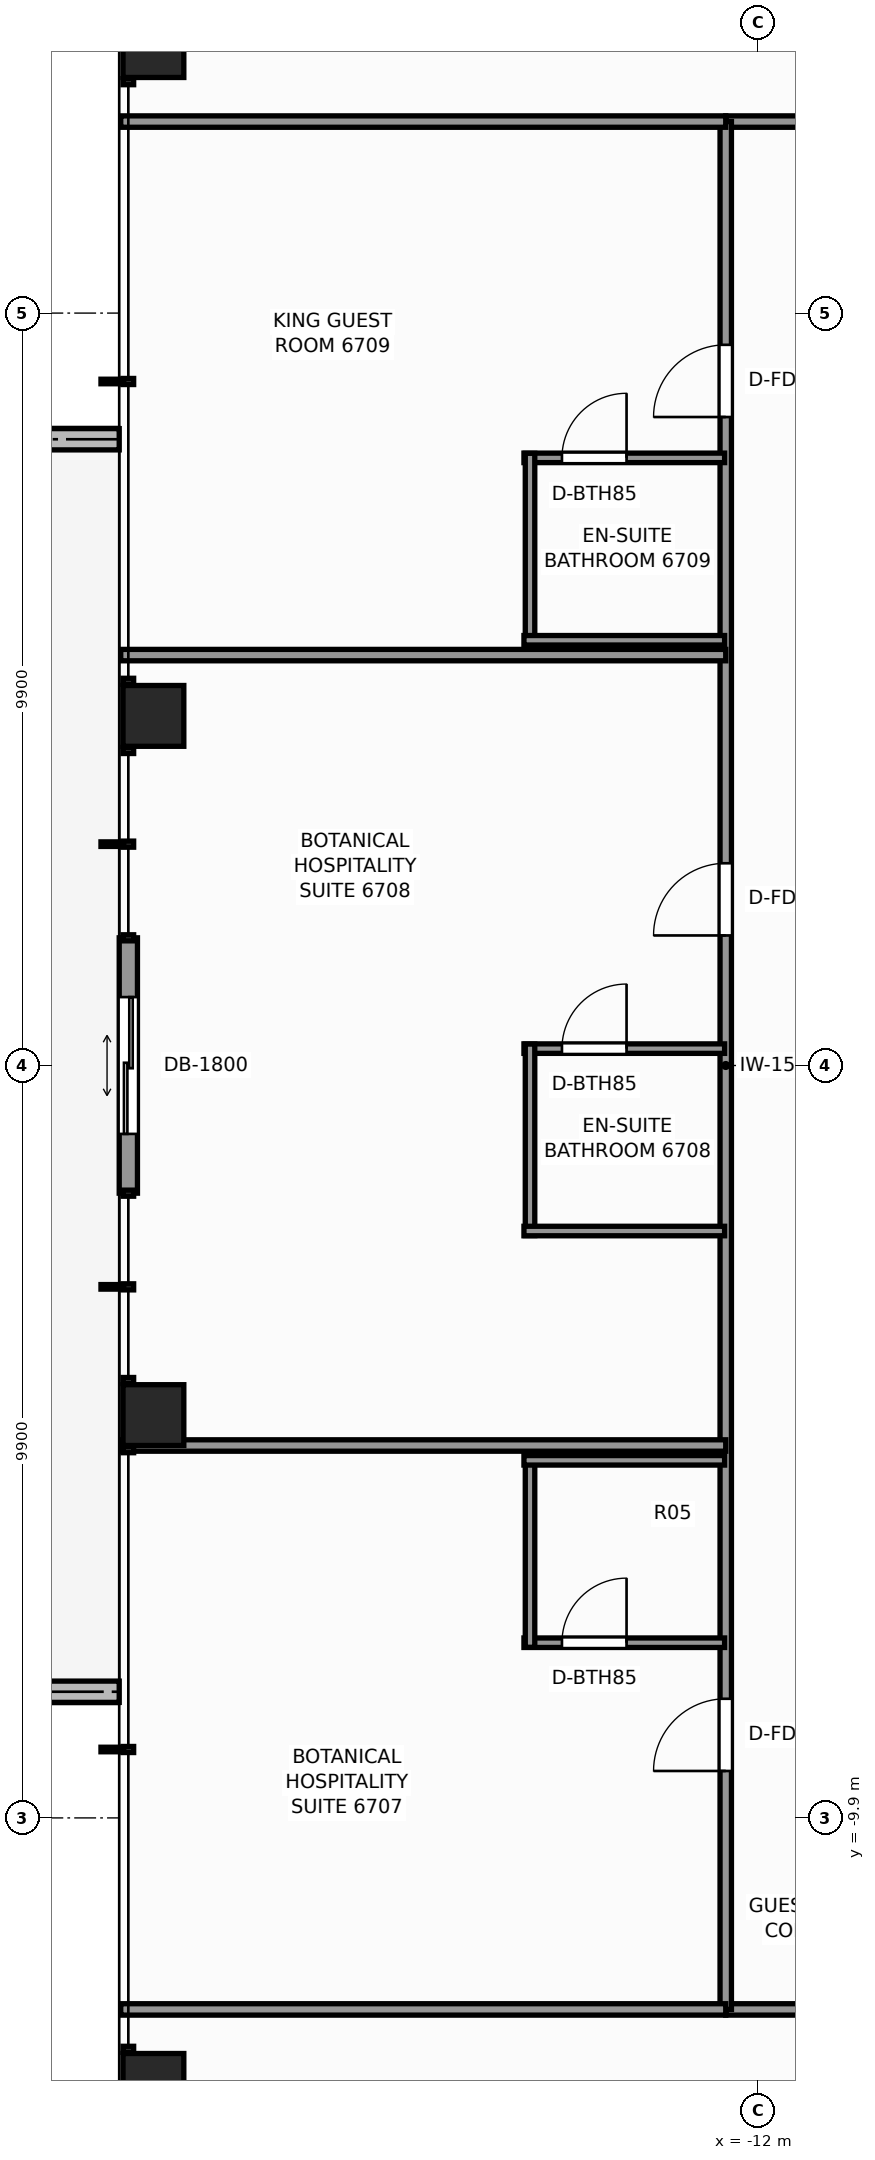
"""IFC4 building model, lengths in metres.
Left out: names, types, materials, properties, quantities, classifications, styles, units other than length and angle.
Written with IfcOpenShell. Run it as: python <this file> out.ifc"""

import sys

from ifc_helpers import new_model, si_unit, direction, frame, frame_2d, origin, origin_2d, place, context, subcontext, project, spatial, rectangle, extrude, element, fill, save


model = new_model("IFC4")
c1 = context("Model", 3, precision=1e-05, world=origin(), true_north=direction((0.0, 1.0)))
c2 = subcontext(c1, "Body", "Model", "MODEL_VIEW")
j1 = project(units=[si_unit("LENGTHUNIT", "METRE"), si_unit("PLANEANGLEUNIT", "RADIAN")], contexts=[c1])
p1 = place(None, origin())
s1 = spatial("IfcSite", under=j1, at=p1, CompositionType="ELEMENT")
p2 = place(p1, origin())
s2 = spatial("IfcBuilding", under=s1, at=p2, CompositionType="ELEMENT")
p3 = place(p2, frame((0.0, 0.0, 229.5)))
s3 = spatial("IfcBuildingStorey", under=s2, at=p3, CompositionType="ELEMENT", Elevation=229.5)
for number, where, z_axis, x_axis in (
    (1, (-19.95, -13.4, 0.0), (0.0, 0.0, 1.0), (1.0, 0.0, 0.0)),
    (2, (-19.95, -4.6, 0.0), (0.0, 0.0, 1.0), (1.0, 0.0, 0.0)),
    (3, (-19.95, 4.6, 0.0), (0.0, 0.0, 1.0), (1.0, 0.0, 0.0)),
    (4, (-19.95, 13.4, 0.0), (0.0, 0.0, 1.0), (1.0, 0.0, 0.0)),
):
    element("IfcColumn", number, at=place(p3, frame(where, z_axis=z_axis, x_axis=x_axis)), inside=s3, PredefinedType="COLUMN", context=c2, shape_type="SweptSolid", body=[
        extrude(rectangle(XDim=0.8, YDim=0.8, at=origin_2d()), origin(), (0.0, 0.0, 1.0), 3.3),
    ])
p4 = place(p3, frame((-23.614, -8.24, -0.04), z_axis=(0.0, 0.0, 1.0), x_axis=(1.0, 0.0, 0.0)))
e5 = element("IfcWall", 5, at=p4, inside=s3, PredefinedType="PARAPET", context=c2, shape_type="SweptSolid", body=[
    extrude(rectangle(XDim=3.214, YDim=0.28, at=frame_2d((1.607, 0.0))), origin(), (0.0, 0.0, 1.0), 0.42),
])
p5 = place(p3, frame((-20.4, 8.24, -0.04), z_axis=(0.0, 0.0, 1.0), x_axis=(-1.0, 0.0, 0.0)))
e6 = element("IfcWall", 6, at=p5, inside=s3, PredefinedType="PARAPET", context=c2, shape_type="SweptSolid", body=[
    extrude(rectangle(XDim=2.006, YDim=0.28, at=frame_2d((1.003, 0.0))), origin(), (0.0, 0.0, 1.0), 0.42),
])
p6 = place(p3, frame((-20.28, -1.68, 0.0), z_axis=(0.0, 0.0, 1.0), x_axis=(0.0, 1.0, 0.0)))
e7 = element("IfcWall", 7, at=p6, inside=s3, PredefinedType="STANDARD", context=c2, shape_type="SweptSolid", body=[
    extrude(rectangle(XDim=3.36, YDim=0.24, at=frame_2d((1.68, 0.0))), origin(), (0.0, 0.0, 1.0), 2.95),
])
p7 = place(p6, frame((0.78, 0.0, 0.0)))
e8 = element("IfcOpeningElement", 8, at=p7, cuts=e7, PredefinedType="OPENING", context=c2, shape_type="SweptSolid", body=[
    extrude(rectangle(XDim=1.8, YDim=2.2, at=frame_2d((0.9, 1.1))), frame((0.0, 0.13, 0.0), z_axis=(0.0, -1.0, 0.0), x_axis=(1.0, 0.0, 0.0)), (0.0, 0.0, 1.0), 0.26),
])
p8 = place(p3, frame((-12.42, -12.42, 0.0), z_axis=(0.0, 0.0, 1.0), x_axis=(1.0, 0.0, 0.0)))
e9 = element("IfcWall", 9, at=p8, inside=s3, PredefinedType="PARTITIONING", context=c2, shape_type="SweptSolid", body=[
    extrude(rectangle(XDim=24.68, YDim=0.15, at=frame_2d((12.34, 0.0))), origin(), (0.0, 0.0, 1.0), 2.239),
])
p9 = place(p8, frame((4.435, 0.0, 0.0)))
e10 = element("IfcOpeningElement", 10, at=p9, cuts=e9, PredefinedType="OPENING", context=c2, shape_type="SweptSolid", body=[
    extrude(rectangle(XDim=0.9, YDim=2.06, at=frame_2d((0.45, 1.03))), frame((0.0, 0.085, 0.0), z_axis=(0.0, -1.0, 0.0), x_axis=(1.0, 0.0, 0.0)), (0.0, 0.0, 1.0), 0.17),
])
p10 = place(p8, frame((19.505, 0.0, 0.0)))
e11 = element("IfcOpeningElement", 11, at=p10, cuts=e9, PredefinedType="OPENING", context=c2, shape_type="SweptSolid", body=[
    extrude(rectangle(XDim=0.9, YDim=2.06, at=frame_2d((0.45, 1.03))), frame((0.0, 0.085, 0.0), z_axis=(0.0, -1.0, 0.0), x_axis=(1.0, 0.0, 0.0)), (0.0, 0.0, 1.0), 0.17),
])
p11 = place(p3, frame((-12.42, 12.42, 0.0), z_axis=(0.0, 0.0, 1.0), x_axis=(1.0, 0.0, 0.0)))
e12 = element("IfcWall", 12, at=p11, inside=s3, PredefinedType="PARTITIONING", context=c2, shape_type="SweptSolid", body=[
    extrude(rectangle(XDim=24.68, YDim=0.15, at=frame_2d((12.34, 0.0))), origin(), (0.0, 0.0, 1.0), 2.239),
])
p12 = place(p11, frame((3.524, 0.0, 0.0)))
e13 = element("IfcOpeningElement", 13, at=p12, cuts=e12, PredefinedType="OPENING", context=c2, shape_type="SweptSolid", body=[
    extrude(rectangle(XDim=0.9, YDim=2.06, at=frame_2d((0.45, 1.03))), frame((0.0, 0.085, 0.0), z_axis=(0.0, -1.0, 0.0), x_axis=(1.0, 0.0, 0.0)), (0.0, 0.0, 1.0), 0.17),
])
p13 = place(p11, frame((5.859, 0.0, 0.0)))
e14 = element("IfcOpeningElement", 14, at=p13, cuts=e12, PredefinedType="OPENING", context=c2, shape_type="SweptSolid", body=[
    extrude(rectangle(XDim=0.9, YDim=2.06, at=frame_2d((0.45, 1.03))), frame((0.0, 0.085, 0.0), z_axis=(0.0, -1.0, 0.0), x_axis=(1.0, 0.0, 0.0)), (0.0, 0.0, 1.0), 0.17),
])
p14 = place(p11, frame((9.538, 0.0, 0.0)))
e15 = element("IfcOpeningElement", 15, at=p14, cuts=e12, PredefinedType="OPENING", context=c2, shape_type="SweptSolid", body=[
    extrude(rectangle(XDim=0.9, YDim=2.06, at=frame_2d((0.45, 1.03))), frame((0.0, 0.085, 0.0), z_axis=(0.0, -1.0, 0.0), x_axis=(1.0, 0.0, 0.0)), (0.0, 0.0, 1.0), 0.17),
])
p15 = place(p11, frame((13.002, 0.0, 0.0)))
e16 = element("IfcOpeningElement", 16, at=p15, cuts=e12, PredefinedType="OPENING", context=c2, shape_type="SweptSolid", body=[
    extrude(rectangle(XDim=0.95, YDim=2.06, at=frame_2d((0.475, 1.03))), frame((0.0, 0.085, 0.0), z_axis=(0.0, -1.0, 0.0), x_axis=(1.0, 0.0, 0.0)), (0.0, 0.0, 1.0), 0.17),
])
p16 = place(p11, frame((18.515, 0.0, 0.0)))
e17 = element("IfcOpeningElement", 17, at=p16, cuts=e12, PredefinedType="OPENING", context=c2, shape_type="SweptSolid", body=[
    extrude(rectangle(XDim=0.9, YDim=2.06, at=frame_2d((0.45, 1.03))), frame((0.0, 0.085, 0.0), z_axis=(0.0, -1.0, 0.0), x_axis=(1.0, 0.0, 0.0)), (0.0, 0.0, 1.0), 0.17),
])
p17 = place(p11, frame((20.85, 0.0, 0.0)))
e18 = element("IfcOpeningElement", 18, at=p17, cuts=e12, PredefinedType="OPENING", context=c2, shape_type="SweptSolid", body=[
    extrude(rectangle(XDim=0.9, YDim=2.06, at=frame_2d((0.45, 1.03))), frame((0.0, 0.085, 0.0), z_axis=(0.0, -1.0, 0.0), x_axis=(1.0, 0.0, 0.0)), (0.0, 0.0, 1.0), 0.17),
])
p18 = place(p3, frame((-12.42, -12.42, 0.0), z_axis=(0.0, 0.0, 1.0), x_axis=(0.0, 1.0, 0.0)))
e19 = element("IfcWall", 19, at=p18, inside=s3, PredefinedType="PARTITIONING", context=c2, shape_type="SweptSolid", body=[
    extrude(rectangle(XDim=24.84, YDim=0.15, at=frame_2d((12.42, 0.0))), origin(), (0.0, 0.0, 1.0), 2.239),
])
p19 = place(p18, frame((3.137, 0.0, 0.0)))
e20 = element("IfcOpeningElement", 20, at=p19, cuts=e19, PredefinedType="OPENING", context=c2, shape_type="SweptSolid", body=[
    extrude(rectangle(XDim=0.95, YDim=2.06, at=frame_2d((0.475, 1.03))), frame((0.0, 0.085, 0.0), z_axis=(0.0, -1.0, 0.0), x_axis=(1.0, 0.0, 0.0)), (0.0, 0.0, 1.0), 0.17),
])
p20 = place(p18, frame((14.131, 0.0, 0.0)))
e21 = element("IfcOpeningElement", 21, at=p20, cuts=e19, PredefinedType="OPENING", context=c2, shape_type="SweptSolid", body=[
    extrude(rectangle(XDim=0.95, YDim=2.06, at=frame_2d((0.475, 1.03))), frame((0.0, 0.085, 0.0), z_axis=(0.0, -1.0, 0.0), x_axis=(1.0, 0.0, 0.0)), (0.0, 0.0, 1.0), 0.17),
])
p21 = place(p18, frame((20.952, 0.0, 0.0)))
e22 = element("IfcOpeningElement", 22, at=p21, cuts=e19, PredefinedType="OPENING", context=c2, shape_type="SweptSolid", body=[
    extrude(rectangle(XDim=0.95, YDim=2.06, at=frame_2d((0.475, 1.03))), frame((0.0, 0.085, 0.0), z_axis=(0.0, -1.0, 0.0), x_axis=(1.0, 0.0, 0.0)), (0.0, 0.0, 1.0), 0.17),
])
for number, where, z_axis, x_axis in (
    (23, (-20.38, -12.42, 0.0), (0.0, 0.0, 1.0), (1.0, 0.0, 0.0)),
    (24, (-20.38, 12.42, 0.0), (0.0, 0.0, 1.0), (1.0, 0.0, 0.0)),
):
    element("IfcWall", number, at=place(p3, frame(where, z_axis=z_axis, x_axis=x_axis)), inside=s3, PredefinedType="PARTITIONING", context=c2, shape_type="SweptSolid", body=[
        extrude(rectangle(XDim=7.96, YDim=0.15, at=frame_2d((3.98, 0.0))), origin(), (0.0, 0.0, 1.0), 2.239),
    ])
p22 = place(p3, frame((-20.38, -5.0, 0.0), z_axis=(0.0, 0.0, 1.0), x_axis=(1.0, 0.0, 0.0)))
e25 = element("IfcWall", 25, at=p22, inside=s3, PredefinedType="PARTITIONING", context=c2, shape_type="SweptSolid", body=[
    extrude(rectangle(XDim=7.96, YDim=0.15, at=frame_2d((3.98, 0.0))), origin(), (0.0, 0.0, 1.0), 2.323),
])
p23 = place(p3, frame((-15.075, -7.595, 0.0), z_axis=(0.0, 0.0, 1.0), x_axis=(1.0, 0.0, 0.0)))
e26 = element("IfcWall", 26, at=p23, inside=s3, PredefinedType="PARTITIONING", context=c2, shape_type="SweptSolid", body=[
    extrude(rectangle(XDim=2.64, YDim=0.125, at=frame_2d((1.32, 0.0))), origin(), (0.0, 0.0, 1.0), 2.95),
])
p24 = place(p23, frame((0.5, 0.0, 0.0)))
e27 = element("IfcOpeningElement", 27, at=p24, cuts=e26, PredefinedType="OPENING", context=c2, shape_type="SweptSolid", body=[
    extrude(rectangle(XDim=0.85, YDim=2.03, at=frame_2d((0.425, 1.015))), frame((0.0, 0.073, 0.0), z_axis=(0.0, -1.0, 0.0), x_axis=(1.0, 0.0, 0.0)), (0.0, 0.0, 1.0), 0.145),
])
p25 = place(p3, frame((-14.995, -7.655, 0.0), z_axis=(0.0, 0.0, 1.0), x_axis=(0.0, 1.0, 0.0)))
e28 = element("IfcWall", 28, at=p25, inside=s3, PredefinedType="PARTITIONING", context=c2, shape_type="SweptSolid", body=[
    extrude(rectangle(XDim=2.52, YDim=0.125, at=frame_2d((1.26, 0.0))), origin(), (0.0, 0.0, 1.0), 2.95),
])
p26 = place(p3, frame((-15.075, -5.195, 0.0), z_axis=(0.0, 0.0, 1.0), x_axis=(1.0, 0.0, 0.0)))
e29 = element("IfcWall", 29, at=p26, inside=s3, PredefinedType="PARTITIONING", context=c2, shape_type="SweptSolid", body=[
    extrude(rectangle(XDim=2.64, YDim=0.125, at=frame_2d((1.32, 0.0))), origin(), (0.0, 0.0, 1.0), 2.95),
])
p27 = place(p3, frame((-20.38, 5.4, 0.0), z_axis=(0.0, 0.0, 1.0), x_axis=(1.0, 0.0, 0.0)))
e30 = element("IfcWall", 30, at=p27, inside=s3, PredefinedType="PARTITIONING", context=c2, shape_type="SweptSolid", body=[
    extrude(rectangle(XDim=7.96, YDim=0.15, at=frame_2d((3.98, 0.0))), origin(), (0.0, 0.0, 1.0), 2.323),
])
p28 = place(p3, frame((-15.075, 0.222, 0.0), z_axis=(0.0, 0.0, 1.0), x_axis=(1.0, 0.0, 0.0)))
e31 = element("IfcWall", 31, at=p28, inside=s3, PredefinedType="PARTITIONING", context=c2, shape_type="SweptSolid", body=[
    extrude(rectangle(XDim=2.64, YDim=0.125, at=frame_2d((1.32, 0.0))), origin(), (0.0, 0.0, 1.0), 2.95),
])
p29 = place(p28, frame((0.5, 0.0, 0.0)))
e32 = element("IfcOpeningElement", 32, at=p29, cuts=e31, PredefinedType="OPENING", context=c2, shape_type="SweptSolid", body=[
    extrude(rectangle(XDim=0.85, YDim=2.03, at=frame_2d((0.425, 1.015))), frame((0.0, 0.073, 0.0), z_axis=(0.0, -1.0, 0.0), x_axis=(1.0, 0.0, 0.0)), (0.0, 0.0, 1.0), 0.145),
])
p30 = place(p3, frame((-14.995, -2.238, 0.0), z_axis=(0.0, 0.0, 1.0), x_axis=(0.0, 1.0, 0.0)))
e33 = element("IfcWall", 33, at=p30, inside=s3, PredefinedType="PARTITIONING", context=c2, shape_type="SweptSolid", body=[
    extrude(rectangle(XDim=2.52, YDim=0.125, at=frame_2d((1.26, 0.0))), origin(), (0.0, 0.0, 1.0), 2.475),
])
p31 = place(p3, frame((-15.075, -2.178, 0.0), z_axis=(0.0, 0.0, 1.0), x_axis=(1.0, 0.0, 0.0)))
e34 = element("IfcWall", 34, at=p31, inside=s3, PredefinedType="PARTITIONING", context=c2, shape_type="SweptSolid", body=[
    extrude(rectangle(XDim=2.64, YDim=0.125, at=frame_2d((1.32, 0.0))), origin(), (0.0, 0.0, 1.0), 2.95),
])
p32 = place(p3, frame((-15.075, 7.995, 0.0), z_axis=(0.0, 0.0, 1.0), x_axis=(1.0, 0.0, 0.0)))
e35 = element("IfcWall", 35, at=p32, inside=s3, PredefinedType="PARTITIONING", context=c2, shape_type="SweptSolid", body=[
    extrude(rectangle(XDim=2.64, YDim=0.125, at=frame_2d((1.32, 0.0))), origin(), (0.0, 0.0, 1.0), 2.95),
])
p33 = place(p32, frame((0.5, 0.0, 0.0)))
e36 = element("IfcOpeningElement", 36, at=p33, cuts=e35, PredefinedType="OPENING", context=c2, shape_type="SweptSolid", body=[
    extrude(rectangle(XDim=0.85, YDim=2.03, at=frame_2d((0.425, 1.015))), frame((0.0, 0.073, 0.0), z_axis=(0.0, -1.0, 0.0), x_axis=(1.0, 0.0, 0.0)), (0.0, 0.0, 1.0), 0.145),
])
p34 = place(p3, frame((-14.995, 5.535, 0.0), z_axis=(0.0, 0.0, 1.0), x_axis=(0.0, 1.0, 0.0)))
e37 = element("IfcWall", 37, at=p34, inside=s3, PredefinedType="PARTITIONING", context=c2, shape_type="SweptSolid", body=[
    extrude(rectangle(XDim=2.52, YDim=0.125, at=frame_2d((1.26, 0.0))), origin(), (0.0, 0.0, 1.0), 2.95),
])
p35 = place(p3, frame((-15.075, 5.595, 0.0), z_axis=(0.0, 0.0, 1.0), x_axis=(1.0, 0.0, 0.0)))
e38 = element("IfcWall", 38, at=p35, inside=s3, PredefinedType="PARTITIONING", context=c2, shape_type="SweptSolid", body=[
    extrude(rectangle(XDim=2.64, YDim=0.125, at=frame_2d((1.32, 0.0))), origin(), (0.0, 0.0, 1.0), 2.95),
])
p36 = place(p7, origin())
e39 = element("IfcDoor", 39, at=p36, inside=s3, OperationType="DOUBLE_DOOR_SLIDING", PredefinedType="DOOR", context=c2, shape_type="SweptSolid", body=[
    extrude(rectangle(XDim=1.8, YDim=2.2, at=frame_2d((0.9, 1.1))), frame((0.0, 0.025, 0.0), z_axis=(0.0, -1.0, 0.0), x_axis=(1.0, 0.0, 0.0)), (0.0, 0.0, 1.0), 0.05),
])
fill(e8, e39)
p37 = place(p24, origin())
e40 = element("IfcDoor", 40, at=p37, inside=s3, OperationType="SINGLE_SWING_RIGHT", PredefinedType="DOOR", context=c2, shape_type="SweptSolid", body=[
    extrude(rectangle(XDim=0.85, YDim=2.03, at=frame_2d((0.425, 1.015))), frame((0.0, 0.025, 0.0), z_axis=(0.0, -1.0, 0.0), x_axis=(1.0, 0.0, 0.0)), (0.0, 0.0, 1.0), 0.05),
])
fill(e27, e40)
p38 = place(p19, origin())
e41 = element("IfcDoor", 41, at=p38, inside=s3, OperationType="SINGLE_SWING_LEFT", PredefinedType="DOOR", context=c2, shape_type="SweptSolid", body=[
    extrude(rectangle(XDim=0.95, YDim=2.06, at=frame_2d((0.475, 1.03))), frame((0.0, 0.025, 0.0), z_axis=(0.0, -1.0, 0.0), x_axis=(1.0, 0.0, 0.0)), (0.0, 0.0, 1.0), 0.05),
])
fill(e20, e41)
p39 = place(p29, origin())
e42 = element("IfcDoor", 42, at=p39, inside=s3, OperationType="SINGLE_SWING_RIGHT", PredefinedType="DOOR", context=c2, shape_type="SweptSolid", body=[
    extrude(rectangle(XDim=0.85, YDim=2.03, at=frame_2d((0.425, 1.015))), frame((0.0, 0.025, 0.0), z_axis=(0.0, -1.0, 0.0), x_axis=(1.0, 0.0, 0.0)), (0.0, 0.0, 1.0), 0.05),
])
fill(e32, e42)
p40 = place(p20, origin())
e43 = element("IfcDoor", 43, at=p40, inside=s3, OperationType="SINGLE_SWING_LEFT", PredefinedType="DOOR", context=c2, shape_type="SweptSolid", body=[
    extrude(rectangle(XDim=0.95, YDim=2.06, at=frame_2d((0.475, 1.03))), frame((0.0, 0.025, 0.0), z_axis=(0.0, -1.0, 0.0), x_axis=(1.0, 0.0, 0.0)), (0.0, 0.0, 1.0), 0.05),
])
fill(e21, e43)
p41 = place(p33, origin())
e44 = element("IfcDoor", 44, at=p41, inside=s3, OperationType="SINGLE_SWING_RIGHT", PredefinedType="DOOR", context=c2, shape_type="SweptSolid", body=[
    extrude(rectangle(XDim=0.85, YDim=2.03, at=frame_2d((0.425, 1.015))), frame((0.0, 0.025, 0.0), z_axis=(0.0, -1.0, 0.0), x_axis=(1.0, 0.0, 0.0)), (0.0, 0.0, 1.0), 0.05),
])
fill(e36, e44)
p42 = place(p21, origin())
e45 = element("IfcDoor", 45, at=p42, inside=s3, OperationType="SINGLE_SWING_LEFT", PredefinedType="DOOR", context=c2, shape_type="SweptSolid", body=[
    extrude(rectangle(XDim=0.95, YDim=2.06, at=frame_2d((0.475, 1.03))), frame((0.0, 0.025, 0.0), z_axis=(0.0, -1.0, 0.0), x_axis=(1.0, 0.0, 0.0)), (0.0, 0.0, 1.0), 0.05),
])
fill(e22, e45)
save(model, sys.argv[1])
